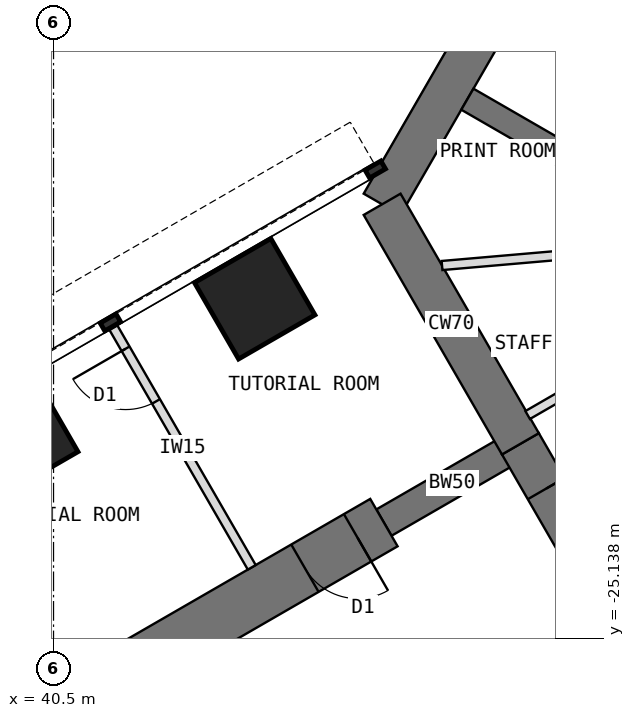
"""IFC4 building model, lengths in metres.
Left out: names, types, materials, properties, quantities, classifications, styles, units other than length and angle.
Written with IfcOpenShell. Run it as: python <this file> out.ifc"""

import sys

from ifc_helpers import new_model, si_unit, direction, frame, frame_2d, origin, origin_2d, place, context, subcontext, project, spatial, rectangle, extrude, element, fill, save


model = new_model("IFC4")
c1 = context("Model", 3, precision=1e-05, world=origin(), true_north=direction((0.0, 1.0)))
c2 = subcontext(c1, "Body", "Model", "MODEL_VIEW")
j1 = project(units=[si_unit("LENGTHUNIT", "METRE"), si_unit("PLANEANGLEUNIT", "RADIAN")], contexts=[c1])
p1 = place(None, origin())
s1 = spatial("IfcSite", under=j1, at=p1, CompositionType="ELEMENT")
p2 = place(p1, origin())
s2 = spatial("IfcBuilding", under=s1, at=p2, CompositionType="ELEMENT")
p3 = place(p2, frame((0.0, 0.0, 60.5)))
s3 = spatial("IfcBuildingStorey", under=s2, at=p3, CompositionType="ELEMENT", Elevation=60.5)
p4 = place(p3, frame((52.202, -7.092, 0.0), z_axis=(0.0, 0.0, 1.0), x_axis=(-0.500005998175, -0.866021940709, 0.0)))
e1 = element("IfcWall", 1, at=p4, inside=s3, PredefinedType="SHEAR", context=c2, shape_type="SweptSolid", body=[
    extrude(rectangle(XDim=12.596, YDim=0.7, at=frame_2d((6.298, 0.0))), origin(), (0.0, 0.0, 1.0), 4.0),
])
p5 = place(p3, frame((45.904, -18.0, 0.0), z_axis=(0.0, 0.0, 1.0), x_axis=(0.500024481964, -0.866011268655, 0.0)))
e2 = element("IfcWall", 2, at=p5, inside=s3, PredefinedType="SHEAR", context=c2, shape_type="SweptSolid", body=[
    extrude(rectangle(XDim=4.548, YDim=0.7, at=frame_2d((2.274, 0.0))), origin(), (0.0, 0.0, 1.0), 4.0),
])
p6 = place(p3, frame((48.178, -21.939, 0.0), z_axis=(0.0, 0.0, 1.0), x_axis=(0.500010275428, -0.866019471182, 0.0)))
e3 = element("IfcWall", 3, at=p6, inside=s3, PredefinedType="SHEAR", context=c2, shape_type="SweptSolid", body=[
    extrude(rectangle(XDim=3.5, YDim=0.7, at=frame_2d((1.75, 0.0))), origin(), (0.0, 0.0, 1.0), 4.0),
])
p7 = place(p6, frame((0.85, 0.0, 0.0)))
e4 = element("IfcOpeningElement", 4, at=p7, cuts=e3, PredefinedType="OPENING", context=c2, shape_type="SweptSolid", body=[
    extrude(rectangle(XDim=1.8, YDim=2.1, at=frame_2d((0.9, 1.05))), frame((0.0, 0.36, 0.0), z_axis=(0.0, -1.0, 0.0), x_axis=(1.0, 0.0, 0.0)), (0.0, 0.0, 1.0), 0.72),
])
for number, where, z_axis, x_axis in (
    (5, (49.928, -24.97, 0.0), (0.0, 0.0, 1.0), (-0.866, -0.5, 0.0)),
    (6, (48.178, -21.939, 0.0), (0.0, 0.0, 1.0), (-0.866, -0.5, 0.0)),
):
    element("IfcWall", number, at=place(p3, frame(where, z_axis=z_axis, x_axis=x_axis)), inside=s3, PredefinedType="SHEAR", context=c2, shape_type="SweptSolid", body=[
        extrude(rectangle(XDim=2.592, YDim=0.5, at=frame_2d((1.296, 0.0))), origin(), (0.0, 0.0, 1.0), 4.0),
    ])
p8 = place(p3, frame((45.934, -23.234, 0.0), z_axis=(0.0, 0.0, 1.0), x_axis=(-0.866019570528, -0.500010103361, 0.0)))
e7 = element("IfcWall", 7, at=p8, inside=s3, PredefinedType="SHEAR", context=c2, shape_type="SweptSolid", body=[
    extrude(rectangle(XDim=13.2, YDim=0.9, at=frame_2d((6.6, 0.0))), origin(), (0.0, 0.0, 1.0), 4.0),
])
p9 = place(p8, frame((0.5, 0.0, 0.0)))
e8 = element("IfcOpeningElement", 8, at=p9, cuts=e7, PredefinedType="OPENING", context=c2, shape_type="SweptSolid", body=[
    extrude(rectangle(XDim=1.0, YDim=2.1, at=frame_2d((0.5, 1.05))), frame((0.0, 0.46, 0.0), z_axis=(0.0, -1.0, 0.0), x_axis=(1.0, 0.0, 0.0)), (0.0, 0.0, 1.0), 0.92),
])
p10 = place(p8, frame((7.25, 0.0, 0.0)))
e9 = element("IfcOpeningElement", 9, at=p10, cuts=e7, PredefinedType="OPENING", context=c2, shape_type="SweptSolid", body=[
    extrude(rectangle(XDim=1.0, YDim=2.1, at=frame_2d((0.5, 1.05))), frame((0.0, 0.46, 0.0), z_axis=(0.0, -1.0, 0.0), x_axis=(1.0, 0.0, 0.0)), (0.0, 0.0, 1.0), 0.92),
])
for number, where, z_axis, x_axis in (
    (10, (43.809, -19.554, 0.0), (0.0, 0.0, 1.0), (0.866, 0.5, 0.0)),
    (11, (39.912, -21.804, 0.0), (0.0, 0.0, 1.0), (0.866, 0.5, 0.0)),
):
    element("IfcColumn", number, at=place(p3, frame(where, z_axis=z_axis, x_axis=x_axis)), inside=s3, PredefinedType="COLUMN", context=c2, shape_type="SweptSolid", body=[
        extrude(rectangle(XDim=1.45, YDim=1.45, at=origin_2d()), origin(), (0.0, 0.0, 1.0), 4.0),
    ])
p11 = place(p3, frame((52.38, -19.201, 0.0), z_axis=(0.0, 0.0, 1.0), x_axis=(-0.866023886965, 0.500002627198, 0.0)))
e12 = element("IfcWall", 12, at=p11, inside=s3, PredefinedType="SHEAR", context=c2, shape_type="SweptSolid", body=[
    extrude(rectangle(XDim=5.858, YDim=0.4, at=frame_2d((2.929, 0.0))), origin(), (0.0, 0.0, 1.0), 4.0),
])
p12 = place(p3, frame((43.76, -23.97, 0.0), z_axis=(0.0, 0.0, 1.0), x_axis=(-0.499982560684, 0.866035472144, 0.0)))
e13 = element("IfcWall", 13, at=p12, inside=s3, PredefinedType="PARTITIONING", context=c2, shape_type="SweptSolid", body=[
    extrude(rectangle(XDim=4.55, YDim=0.15, at=frame_2d((2.275, 0.0))), origin(), (0.0, 0.0, 1.0), 3.8),
])
p13 = place(p12, frame((3.15, 0.0, 0.0)))
e14 = element("IfcOpeningElement", 14, at=p13, cuts=e13, PredefinedType="OPENING", context=c2, shape_type="SweptSolid", body=[
    extrude(rectangle(XDim=1.0, YDim=2.1, at=frame_2d((0.5, 1.05))), frame((0.0, 0.085, 0.0), z_axis=(0.0, -1.0, 0.0), x_axis=(1.0, 0.0, 0.0)), (0.0, 0.0, 1.0), 0.17),
])
p14 = place(p3, frame((48.298, -21.466, 0.0), z_axis=(0.0, 0.0, 1.0), x_axis=(0.866021148949, 0.500007369519, 0.0)))
e15 = element("IfcWall", 15, at=p14, inside=s3, PredefinedType="PARTITIONING", context=c2, shape_type="SweptSolid", body=[
    extrude(rectangle(XDim=4.426, YDim=0.15, at=frame_2d((2.213, 0.0))), origin(), (0.0, 0.0, 1.0), 3.8),
])
p15 = place(p14, frame((2.598, 0.0, 0.0)))
e16 = element("IfcOpeningElement", 16, at=p15, cuts=e15, PredefinedType="OPENING", context=c2, shape_type="SweptSolid", body=[
    extrude(rectangle(XDim=1.0, YDim=2.1, at=frame_2d((0.5, 1.05))), frame((0.0, 0.085, 0.0), z_axis=(0.0, -1.0, 0.0), x_axis=(1.0, 0.0, 0.0)), (0.0, 0.0, 1.0), 0.17),
])
p16 = place(p3, frame((51.371, -18.618, 0.0), z_axis=(0.0, 0.0, 1.0), x_axis=(-0.996259708579, -0.086409450071, 0.0)))
e17 = element("IfcWall", 17, at=p16, inside=s3, PredefinedType="PARTITIONING", context=c2, shape_type="SweptSolid", body=[
    extrude(rectangle(XDim=4.498, YDim=0.15, at=frame_2d((2.249, 0.0))), origin(), (0.0, 0.0, 1.0), 3.8),
])
p17 = place(p16, frame((0.849, 0.0, 0.0)))
e18 = element("IfcOpeningElement", 18, at=p17, cuts=e17, PredefinedType="OPENING", context=c2, shape_type="SweptSolid", body=[
    extrude(rectangle(XDim=1.0, YDim=2.1, at=frame_2d((0.5, 1.05))), frame((0.0, 0.085, 0.0), z_axis=(0.0, -1.0, 0.0), x_axis=(1.0, 0.0, 0.0)), (0.0, 0.0, 1.0), 0.17),
])
p18 = place(p7, origin())
e19 = element("IfcDoor", 19, at=p18, inside=s3, OperationType="DOUBLE_DOOR_DOUBLE_SWING", PredefinedType="DOOR", context=c2, shape_type="SweptSolid", body=[
    extrude(rectangle(XDim=1.72, YDim=2.06, at=frame_2d((0.9, 1.03))), frame((0.0, 0.025, 0.0), z_axis=(0.0, -1.0, 0.0), x_axis=(1.0, 0.0, 0.0)), (0.0, 0.0, 1.0), 0.05),
    extrude(rectangle(XDim=0.04, YDim=2.1, at=frame_2d((0.02, 1.05))), frame((0.0, 0.35, 0.0), z_axis=(0.0, -1.0, 0.0), x_axis=(1.0, 0.0, 0.0)), (0.0, 0.0, 1.0), 0.699),
    extrude(rectangle(XDim=0.04, YDim=2.1, at=frame_2d((1.78, 1.05))), frame((0.0, 0.35, 0.0), z_axis=(0.0, -1.0, 0.0), x_axis=(1.0, 0.0, 0.0)), (0.0, 0.0, 1.0), 0.699),
    extrude(rectangle(XDim=1.72, YDim=0.04, at=frame_2d((0.9, 2.08))), frame((0.0, 0.35, 0.0), z_axis=(0.0, -1.0, 0.0), x_axis=(1.0, 0.0, 0.0)), (0.0, 0.0, 1.0), 0.699),
])
fill(e4, e19)
p19 = place(p13, origin())
e20 = element("IfcDoor", 20, at=p19, inside=s3, OperationType="SINGLE_SWING_RIGHT", PredefinedType="DOOR", context=c2, shape_type="SweptSolid", body=[
    extrude(rectangle(XDim=1.0, YDim=2.1, at=frame_2d((0.5, 1.05))), frame((0.0, 0.025, 0.0), z_axis=(0.0, -1.0, 0.0), x_axis=(1.0, 0.0, 0.0)), (0.0, 0.0, 1.0), 0.05),
])
fill(e14, e20)
p20 = place(p9, origin())
e21 = element("IfcDoor", 21, at=p20, inside=s3, OperationType="SINGLE_SWING_LEFT", PredefinedType="DOOR", context=c2, shape_type="SweptSolid", body=[
    extrude(rectangle(XDim=0.92, YDim=2.06, at=frame_2d((0.5, 1.03))), frame((0.0, 0.025, 0.0), z_axis=(0.0, -1.0, 0.0), x_axis=(1.0, 0.0, 0.0)), (0.0, 0.0, 1.0), 0.05),
    extrude(rectangle(XDim=0.04, YDim=2.1, at=frame_2d((0.02, 1.05))), frame((0.0, 0.45, 0.0), z_axis=(0.0, -1.0, 0.0), x_axis=(1.0, 0.0, 0.0)), (0.0, 0.0, 1.0), 0.899),
    extrude(rectangle(XDim=0.04, YDim=2.1, at=frame_2d((0.98, 1.05))), frame((0.0, 0.45, 0.0), z_axis=(0.0, -1.0, 0.0), x_axis=(1.0, 0.0, 0.0)), (0.0, 0.0, 1.0), 0.899),
    extrude(rectangle(XDim=0.92, YDim=0.04, at=frame_2d((0.5, 2.08))), frame((0.0, 0.45, 0.0), z_axis=(0.0, -1.0, 0.0), x_axis=(1.0, 0.0, 0.0)), (0.0, 0.0, 1.0), 0.899),
])
fill(e8, e21)
save(model, sys.argv[1])
